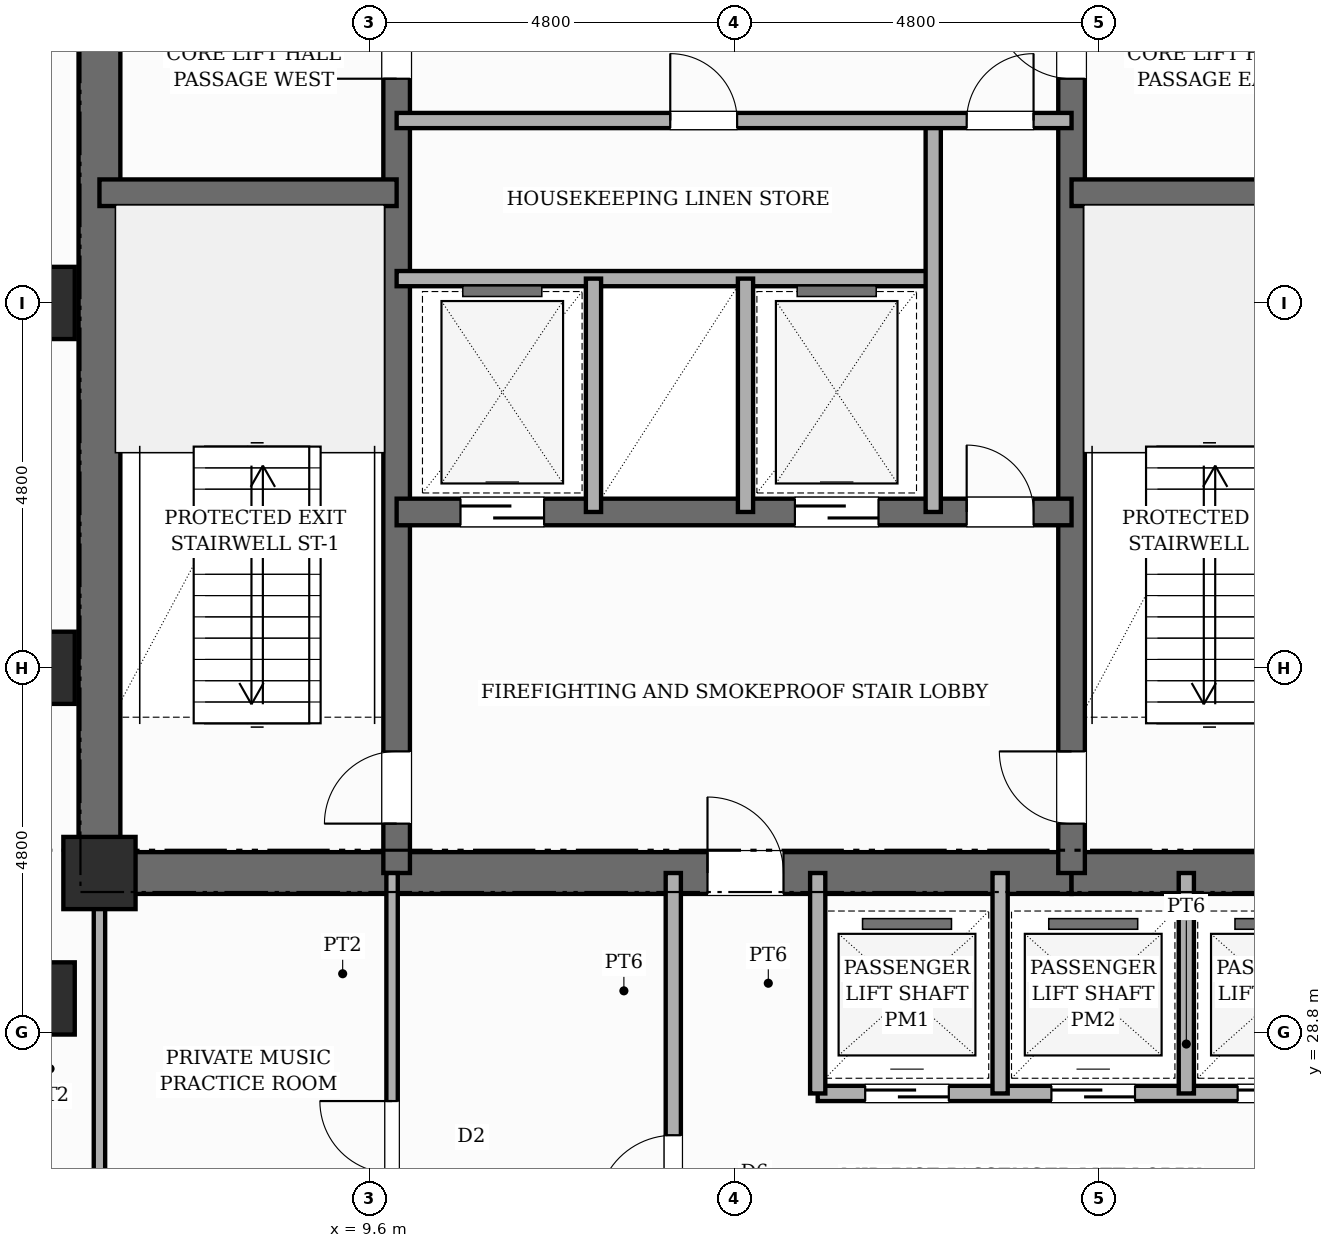
"""IFC4 building model, lengths in metres.
Left out: names, types, materials, properties, quantities, classifications, styles, units other than length and angle.
Written with IfcOpenShell. Run it as: python <this file> out.ifc"""

import sys

from ifc_helpers import new_model, si_unit, direction, frame, frame_2d, origin, origin_2d, place, context, subcontext, project, spatial, rectangle, extrude, element, fill, save


model = new_model("IFC4")
c1 = context("Model", 3, precision=1e-05, world=origin(), true_north=direction((0.0, 1.0)))
c2 = subcontext(c1, "Body", "Model", "MODEL_VIEW")
j1 = project(units=[si_unit("LENGTHUNIT", "METRE"), si_unit("PLANEANGLEUNIT", "RADIAN")], contexts=[c1])
p1 = place(None, origin())
s1 = spatial("IfcSite", under=j1, at=p1, CompositionType="ELEMENT")
p2 = place(p1, origin())
s2 = spatial("IfcBuilding", under=s1, at=p2, CompositionType="ELEMENT")
p3 = place(p2, frame((0.0, 0.0, 193.6)))
s3 = spatial("IfcBuildingStorey", under=s2, at=p3, CompositionType="ELEMENT", Elevation=193.6)
p4 = place(p3, frame((6.05, 30.625, 0.0), z_axis=(0.0, 0.0, 1.0), x_axis=(0.0, 1.0, 0.0)))
e1 = element("IfcWall", 1, at=p4, inside=s3, PredefinedType="SHEAR", context=c2, shape_type="SweptSolid", body=[
    extrude(rectangle(XDim=15.45, YDim=0.55, at=frame_2d((7.725, 0.0))), origin(), (0.0, 0.0, 1.0), 4.8),
])
p5 = place(p3, frame((6.05, 30.9, 0.0), z_axis=(0.0, 0.0, 1.0), x_axis=(1.0, 0.0, 0.0)))
e2 = element("IfcWall", 2, at=p5, inside=s3, PredefinedType="SHEAR", context=c2, shape_type="SweptSolid", body=[
    extrude(rectangle(XDim=3.91, YDim=0.55, at=frame_2d((1.955, 0.0))), origin(), (0.0, 0.0, 1.0), 4.8),
])
p6 = place(p3, frame((9.96, 30.9, 0.0), z_axis=(0.0, 0.0, 1.0), x_axis=(1.0, 0.0, 0.0)))
e3 = element("IfcWall", 3, at=p6, inside=s3, PredefinedType="SHEAR", context=c2, shape_type="SweptSolid", body=[
    extrude(rectangle(XDim=8.88, YDim=0.55, at=frame_2d((4.44, 0.0))), origin(), (0.0, 0.0, 1.0), 4.8),
])
p7 = place(p6, frame((4.09, 0.0, 0.0)))
e4 = element("IfcOpeningElement", 4, at=p7, cuts=e3, PredefinedType="OPENING", context=c2, shape_type="SweptSolid", body=[
    extrude(rectangle(XDim=1.0, YDim=2.15, at=frame_2d((0.5, 1.075))), frame((0.0, 0.285, 0.0), z_axis=(0.0, -1.0, 0.0), x_axis=(1.0, 0.0, 0.0)), (0.0, 0.0, 1.0), 0.57),
])
p8 = place(p3, frame((18.84, 30.9, 0.0), z_axis=(0.0, 0.0, 1.0), x_axis=(1.0, 0.0, 0.0)))
e5 = element("IfcWall", 5, at=p8, inside=s3, PredefinedType="SHEAR", context=c2, shape_type="SweptSolid", body=[
    extrude(rectangle(XDim=3.91, YDim=0.55, at=frame_2d((1.955, 0.0))), origin(), (0.0, 0.0, 1.0), 4.8),
])
p9 = place(p3, frame((9.96, 30.9, 0.0), z_axis=(0.0, 0.0, 1.0), x_axis=(0.0, 1.0, 0.0)))
e6 = element("IfcWall", 6, at=p9, inside=s3, PredefinedType="SHEAR", context=c2, shape_type="SweptSolid", body=[
    extrude(rectangle(XDim=14.9, YDim=0.35, at=frame_2d((7.45, 0.0))), origin(), (0.0, 0.0, 1.0), 4.8),
])
p10 = place(p9, frame((0.65, 0.0, 0.0)))
e7 = element("IfcOpeningElement", 7, at=p10, cuts=e6, PredefinedType="OPENING", context=c2, shape_type="SweptSolid", body=[
    extrude(rectangle(XDim=0.95, YDim=2.1, at=frame_2d((0.475, 1.05))), frame((0.0, 0.185, 0.0), z_axis=(0.0, -1.0, 0.0), x_axis=(1.0, 0.0, 0.0)), (0.0, 0.0, 1.0), 0.37),
])
p11 = place(p9, frame((10.45, 0.0, 0.0)))
e8 = element("IfcOpeningElement", 8, at=p11, cuts=e6, PredefinedType="OPENING", context=c2, shape_type="SweptSolid", body=[
    extrude(rectangle(XDim=1.0, YDim=2.15, at=frame_2d((0.5, 1.075))), frame((0.0, 0.185, 0.0), z_axis=(0.0, -1.0, 0.0), x_axis=(1.0, 0.0, 0.0)), (0.0, 0.0, 1.0), 0.37),
])
p12 = place(p3, frame((18.84, 30.9, 0.0), z_axis=(0.0, 0.0, 1.0), x_axis=(0.0, 1.0, 0.0)))
e9 = element("IfcWall", 9, at=p12, inside=s3, PredefinedType="SHEAR", context=c2, shape_type="SweptSolid", body=[
    extrude(rectangle(XDim=14.9, YDim=0.35, at=frame_2d((7.45, 0.0))), origin(), (0.0, 0.0, 1.0), 4.8),
])
p13 = place(p12, frame((0.65, 0.0, 0.0)))
e10 = element("IfcOpeningElement", 10, at=p13, cuts=e9, PredefinedType="OPENING", context=c2, shape_type="SweptSolid", body=[
    extrude(rectangle(XDim=0.95, YDim=2.1, at=frame_2d((0.475, 1.05))), frame((0.0, 0.185, 0.0), z_axis=(0.0, -1.0, 0.0), x_axis=(1.0, 0.0, 0.0)), (0.0, 0.0, 1.0), 0.37),
])
p14 = place(p12, frame((10.45, 0.0, 0.0)))
e11 = element("IfcOpeningElement", 11, at=p14, cuts=e9, PredefinedType="OPENING", context=c2, shape_type="SweptSolid", body=[
    extrude(rectangle(XDim=1.0, YDim=2.15, at=frame_2d((0.5, 1.075))), frame((0.0, 0.185, 0.0), z_axis=(0.0, -1.0, 0.0), x_axis=(1.0, 0.0, 0.0)), (0.0, 0.0, 1.0), 0.37),
])
for number, where, z_axis, x_axis in (
    (12, (6.05, 39.85, 0.0), (0.0, 0.0, 1.0), (1.0, 0.0, 0.0)),
    (13, (18.84, 39.85, 0.0), (0.0, 0.0, 1.0), (1.0, 0.0, 0.0)),
):
    element("IfcWall", number, at=place(p3, frame(where, z_axis=z_axis, x_axis=x_axis)), inside=s3, PredefinedType="SHEAR", context=c2, shape_type="SweptSolid", body=[
        extrude(rectangle(XDim=3.91, YDim=0.35, at=frame_2d((1.955, 0.0))), origin(), (0.0, 0.0, 1.0), 4.8),
    ])
p15 = place(p3, frame((9.96, 35.65, 0.0), z_axis=(0.0, 0.0, 1.0), x_axis=(1.0, 0.0, 0.0)))
e14 = element("IfcWall", 14, at=p15, inside=s3, PredefinedType="SHEAR", context=c2, shape_type="SweptSolid", body=[
    extrude(rectangle(XDim=8.88, YDim=0.35, at=frame_2d((4.44, 0.0))), origin(), (0.0, 0.0, 1.0), 4.8),
])
p16 = place(p15, frame((0.84, 0.0, 0.0)))
e15 = element("IfcOpeningElement", 15, at=p16, cuts=e14, PredefinedType="OPENING", context=c2, shape_type="SweptSolid", body=[
    extrude(rectangle(XDim=1.1, YDim=2.15, at=frame_2d((0.55, 1.075))), frame((0.0, 0.185, 0.0), z_axis=(0.0, -1.0, 0.0), x_axis=(1.0, 0.0, 0.0)), (0.0, 0.0, 1.0), 0.37),
])
p17 = place(p15, frame((5.24, 0.0, 0.0)))
e16 = element("IfcOpeningElement", 16, at=p17, cuts=e14, PredefinedType="OPENING", context=c2, shape_type="SweptSolid", body=[
    extrude(rectangle(XDim=1.1, YDim=2.15, at=frame_2d((0.55, 1.075))), frame((0.0, 0.185, 0.0), z_axis=(0.0, -1.0, 0.0), x_axis=(1.0, 0.0, 0.0)), (0.0, 0.0, 1.0), 0.37),
])
p18 = place(p15, frame((7.5, 0.0, 0.0)))
e17 = element("IfcOpeningElement", 17, at=p18, cuts=e14, PredefinedType="OPENING", context=c2, shape_type="SweptSolid", body=[
    extrude(rectangle(XDim=0.88, YDim=2.1, at=frame_2d((0.44, 1.05))), frame((0.0, 0.185, 0.0), z_axis=(0.0, -1.0, 0.0), x_axis=(1.0, 0.0, 0.0)), (0.0, 0.0, 1.0), 0.37),
])
for number, where, z_axis, x_axis in (
    (18, (5.25, 29.25, 0.0), (0.0, 0.0, 1.0), (1.0, 0.0, 0.0)),
    (19, (5.25, 33.6, 0.0), (0.0, 0.0, 1.0), (1.0, 0.0, 0.0)),
    (20, (5.25, 38.4, 0.0), (0.0, 0.0, 1.0), (1.0, 0.0, 0.0)),
    (21, (6.05, 30.9, 0.0), (0.0, 0.0, 1.0), (1.0, 0.0, 0.0)),
):
    element("IfcColumn", number, at=place(p3, frame(where, z_axis=z_axis, x_axis=x_axis)), inside=s3, PredefinedType="COLUMN", context=c2, shape_type="SweptSolid", body=[
        extrude(rectangle(XDim=0.95, YDim=0.95, at=origin_2d()), origin(), (0.0, 0.0, 1.0), 4.8),
    ])
p19 = place(p3, frame((9.96, 38.72, 0.0), z_axis=(0.0, 0.0, 1.0), x_axis=(1.0, 0.0, 0.0)))
e22 = element("IfcWall", 22, at=p19, inside=s3, PredefinedType="POLYGONAL", context=c2, shape_type="SweptSolid", body=[
    extrude(rectangle(XDim=7.06, YDim=0.2, at=frame_2d((3.53, 0.0))), origin(), (0.0, 0.0, 1.0), 4.5),
])
for number, where, z_axis, x_axis in (
    (23, (12.55, 35.65, 0.0), (0.0, 0.0, 1.0), (0.0, 1.0, 0.0)),
    (24, (14.55, 35.65, 0.0), (0.0, 0.0, 1.0), (0.0, 1.0, 0.0)),
):
    element("IfcWall", number, at=place(p3, frame(where, z_axis=z_axis, x_axis=x_axis)), inside=s3, PredefinedType="POLYGONAL", context=c2, shape_type="SweptSolid", body=[
        extrude(rectangle(XDim=3.07, YDim=0.2, at=frame_2d((1.535, 0.0))), origin(), (0.0, 0.0, 1.0), 4.5),
    ])
p20 = place(p3, frame((17.02, 35.65, 0.0), z_axis=(0.0, 0.0, 1.0), x_axis=(0.0, 1.0, 0.0)))
e25 = element("IfcWall", 25, at=p20, inside=s3, PredefinedType="POLYGONAL", context=c2, shape_type="SweptSolid", body=[
    extrude(rectangle(XDim=5.15, YDim=0.2, at=frame_2d((2.575, 0.0))), origin(), (0.0, 0.0, 1.0), 4.5),
])
p21 = place(p3, frame((9.96, 40.8, 0.0), z_axis=(0.0, 0.0, 1.0), x_axis=(1.0, 0.0, 0.0)))
e26 = element("IfcWall", 26, at=p21, inside=s3, PredefinedType="POLYGONAL", context=c2, shape_type="SweptSolid", body=[
    extrude(rectangle(XDim=8.88, YDim=0.2, at=frame_2d((4.44, 0.0))), origin(), (0.0, 0.0, 1.0), 4.5),
])
p22 = place(p21, frame((7.5, 0.0, 0.0)))
e27 = element("IfcOpeningElement", 27, at=p22, cuts=e26, PredefinedType="OPENING", context=c2, shape_type="SweptSolid", body=[
    extrude(rectangle(XDim=0.88, YDim=2.1, at=frame_2d((0.44, 1.05))), frame((0.0, 0.11, 0.0), z_axis=(0.0, -1.0, 0.0), x_axis=(1.0, 0.0, 0.0)), (0.0, 0.0, 1.0), 0.22),
])
p23 = place(p21, frame((3.6, 0.0, 0.0)))
e28 = element("IfcOpeningElement", 28, at=p23, cuts=e26, PredefinedType="OPENING", context=c2, shape_type="SweptSolid", body=[
    extrude(rectangle(XDim=0.88, YDim=2.1, at=frame_2d((0.44, 1.05))), frame((0.0, 0.11, 0.0), z_axis=(0.0, -1.0, 0.0), x_axis=(1.0, 0.0, 0.0)), (0.0, 0.0, 1.0), 0.22),
])
p24 = place(p3, frame((13.6, 25.75, 0.0), z_axis=(0.0, 0.0, 1.0), x_axis=(0.0, 1.0, 0.0)))
e29 = element("IfcWall", 29, at=p24, inside=s3, PredefinedType="POLYGONAL", context=c2, shape_type="SweptSolid", body=[
    extrude(rectangle(XDim=5.15, YDim=0.2, at=frame_2d((2.575, 0.0))), origin(), (0.0, 0.0, 1.0), 4.5),
])
p25 = place(p24, frame((0.7, 0.0, 0.0)))
e30 = element("IfcOpeningElement", 30, at=p25, cuts=e29, PredefinedType="OPENING", context=c2, shape_type="SweptSolid", body=[
    extrude(rectangle(XDim=1.0, YDim=2.15, at=frame_2d((0.5, 1.075))), frame((0.0, 0.11, 0.0), z_axis=(0.0, -1.0, 0.0), x_axis=(1.0, 0.0, 0.0)), (0.0, 0.0, 1.0), 0.22),
])
p26 = place(p3, frame((6.05, 25.75, 0.0), z_axis=(0.0, 0.0, 1.0), x_axis=(0.0, 1.0, 0.0)))
e31 = element("IfcWall", 31, at=p26, inside=s3, PredefinedType="PARTITIONING", context=c2, shape_type="SweptSolid", body=[
    extrude(rectangle(XDim=5.15, YDim=0.15, at=frame_2d((2.575, 0.0))), origin(), (0.0, 0.0, 1.0), 4.5),
])
p27 = place(p3, frame((9.9, 25.75, 0.0), z_axis=(0.0, 0.0, 1.0), x_axis=(0.0, 1.0, 0.0)))
e32 = element("IfcWall", 32, at=p27, inside=s3, PredefinedType="PARTITIONING", context=c2, shape_type="SweptSolid", body=[
    extrude(rectangle(XDim=5.15, YDim=0.15, at=frame_2d((2.575, 0.0))), origin(), (0.0, 0.0, 1.0), 4.5),
])
p28 = place(p27, frame((1.2, 0.0, 0.0)))
e33 = element("IfcOpeningElement", 33, at=p28, cuts=e32, PredefinedType="OPENING", context=c2, shape_type="SweptSolid", body=[
    extrude(rectangle(XDim=0.95, YDim=2.15, at=frame_2d((0.475, 1.075))), frame((0.0, 0.085, 0.0), z_axis=(0.0, -1.0, 0.0), x_axis=(1.0, 0.0, 0.0)), (0.0, 0.0, 1.0), 0.17),
])
p29 = place(p3, frame((15.5, 28.0, 0.0), z_axis=(0.0, 0.0, 1.0), x_axis=(1.0, 0.0, 0.0)))
e34 = element("IfcWall", 34, at=p29, inside=s3, PredefinedType="POLYGONAL", context=c2, shape_type="SweptSolid", body=[
    extrude(rectangle(XDim=7.25, YDim=0.2, at=frame_2d((3.625, 0.0))), origin(), (0.0, 0.0, 1.0), 4.5),
])
p30 = place(p29, frame((0.625, 0.0, 0.0)))
e35 = element("IfcOpeningElement", 35, at=p30, cuts=e34, PredefinedType="OPENING", context=c2, shape_type="SweptSolid", body=[
    extrude(rectangle(XDim=1.1, YDim=2.15, at=frame_2d((0.55, 1.075))), frame((0.0, 0.11, 0.0), z_axis=(0.0, -1.0, 0.0), x_axis=(1.0, 0.0, 0.0)), (0.0, 0.0, 1.0), 0.22),
])
p31 = place(p29, frame((3.075, 0.0, 0.0)))
e36 = element("IfcOpeningElement", 36, at=p31, cuts=e34, PredefinedType="OPENING", context=c2, shape_type="SweptSolid", body=[
    extrude(rectangle(XDim=1.1, YDim=2.15, at=frame_2d((0.55, 1.075))), frame((0.0, 0.11, 0.0), z_axis=(0.0, -1.0, 0.0), x_axis=(1.0, 0.0, 0.0)), (0.0, 0.0, 1.0), 0.22),
])
p32 = place(p29, frame((5.525, 0.0, 0.0)))
e37 = element("IfcOpeningElement", 37, at=p32, cuts=e34, PredefinedType="OPENING", context=c2, shape_type="SweptSolid", body=[
    extrude(rectangle(XDim=1.1, YDim=2.15, at=frame_2d((0.55, 1.075))), frame((0.0, 0.11, 0.0), z_axis=(0.0, -1.0, 0.0), x_axis=(1.0, 0.0, 0.0)), (0.0, 0.0, 1.0), 0.22),
])
for number, where, z_axis, x_axis in (
    (38, (15.5, 28.0, 0.0), (0.0, 0.0, 1.0), (0.0, 1.0, 0.0)),
    (39, (17.9, 28.0, 0.0), (0.0, 0.0, 1.0), (0.0, 1.0, 0.0)),
    (40, (20.35, 28.0, 0.0), (0.0, 0.0, 1.0), (0.0, 1.0, 0.0)),
):
    element("IfcWall", number, at=place(p3, frame(where, z_axis=z_axis, x_axis=x_axis)), inside=s3, PredefinedType="POLYGONAL", context=c2, shape_type="SweptSolid", body=[
        extrude(rectangle(XDim=2.9, YDim=0.2, at=frame_2d((1.45, 0.0))), origin(), (0.0, 0.0, 1.0), 4.5),
    ])
p33 = place(p10, origin())
e41 = element("IfcDoor", 41, at=p33, inside=s3, OperationType="SINGLE_SWING_LEFT", PredefinedType="DOOR", context=c2, shape_type="SweptSolid", body=[
    extrude(rectangle(XDim=0.95, YDim=2.1, at=frame_2d((0.475, 1.05))), frame((0.0, 0.025, 0.0), z_axis=(0.0, -1.0, 0.0), x_axis=(1.0, 0.0, 0.0)), (0.0, 0.0, 1.0), 0.05),
])
fill(e7, e41)
p34 = place(p13, origin())
e42 = element("IfcDoor", 42, at=p34, inside=s3, OperationType="SINGLE_SWING_RIGHT", PredefinedType="DOOR", context=c2, shape_type="SweptSolid", body=[
    extrude(rectangle(XDim=0.95, YDim=2.1, at=frame_2d((0.475, 1.05))), frame((0.0, 0.025, 0.0), z_axis=(0.0, -1.0, 0.0), x_axis=(1.0, 0.0, 0.0)), (0.0, 0.0, 1.0), 0.05),
])
fill(e10, e42)
p35 = place(p7, origin())
e43 = element("IfcDoor", 43, at=p35, inside=s3, OperationType="SINGLE_SWING_LEFT", PredefinedType="DOOR", context=c2, shape_type="SweptSolid", body=[
    extrude(rectangle(XDim=1.0, YDim=2.15, at=frame_2d((0.5, 1.075))), frame((0.0, 0.025, 0.0), z_axis=(0.0, -1.0, 0.0), x_axis=(1.0, 0.0, 0.0)), (0.0, 0.0, 1.0), 0.05),
])
fill(e4, e43)
p36 = place(p16, origin())
e44 = element("IfcDoor", 44, at=p36, inside=s3, OperationType="SLIDING_TO_LEFT", PredefinedType="DOOR", context=c2, shape_type="SweptSolid", body=[
    extrude(rectangle(XDim=1.1, YDim=2.15, at=frame_2d((0.55, 1.075))), frame((0.0, 0.025, 0.0), z_axis=(0.0, -1.0, 0.0), x_axis=(1.0, 0.0, 0.0)), (0.0, 0.0, 1.0), 0.05),
])
fill(e15, e44)
p37 = place(p17, origin())
e45 = element("IfcDoor", 45, at=p37, inside=s3, OperationType="SLIDING_TO_RIGHT", PredefinedType="DOOR", context=c2, shape_type="SweptSolid", body=[
    extrude(rectangle(XDim=1.1, YDim=2.15, at=frame_2d((0.55, 1.075))), frame((0.0, 0.025, 0.0), z_axis=(0.0, -1.0, 0.0), x_axis=(1.0, 0.0, 0.0)), (0.0, 0.0, 1.0), 0.05),
])
fill(e16, e45)
p38 = place(p18, origin())
e46 = element("IfcDoor", 46, at=p38, inside=s3, OperationType="SINGLE_SWING_LEFT", PredefinedType="DOOR", context=c2, shape_type="SweptSolid", body=[
    extrude(rectangle(XDim=0.88, YDim=2.1, at=frame_2d((0.44, 1.05))), frame((0.0, 0.025, 0.0), z_axis=(0.0, -1.0, 0.0), x_axis=(1.0, 0.0, 0.0)), (0.0, 0.0, 1.0), 0.05),
])
fill(e17, e46)
p39 = place(p22, origin())
e47 = element("IfcDoor", 47, at=p39, inside=s3, OperationType="SINGLE_SWING_RIGHT", PredefinedType="DOOR", context=c2, shape_type="SweptSolid", body=[
    extrude(rectangle(XDim=0.88, YDim=2.1, at=frame_2d((0.44, 1.05))), frame((0.0, 0.025, 0.0), z_axis=(0.0, -1.0, 0.0), x_axis=(1.0, 0.0, 0.0)), (0.0, 0.0, 1.0), 0.05),
])
fill(e27, e47)
p40 = place(p11, origin())
e48 = element("IfcDoor", 48, at=p40, inside=s3, OperationType="SINGLE_SWING_LEFT", PredefinedType="DOOR", context=c2, shape_type="SweptSolid", body=[
    extrude(rectangle(XDim=1.0, YDim=2.15, at=frame_2d((0.5, 1.075))), frame((0.0, 0.025, 0.0), z_axis=(0.0, -1.0, 0.0), x_axis=(1.0, 0.0, 0.0)), (0.0, 0.0, 1.0), 0.05),
])
fill(e8, e48)
p41 = place(p14, origin())
e49 = element("IfcDoor", 49, at=p41, inside=s3, OperationType="SINGLE_SWING_RIGHT", PredefinedType="DOOR", context=c2, shape_type="SweptSolid", body=[
    extrude(rectangle(XDim=1.0, YDim=2.15, at=frame_2d((0.5, 1.075))), frame((0.0, 0.025, 0.0), z_axis=(0.0, -1.0, 0.0), x_axis=(1.0, 0.0, 0.0)), (0.0, 0.0, 1.0), 0.05),
])
fill(e11, e49)
p42 = place(p23, origin())
e50 = element("IfcDoor", 50, at=p42, inside=s3, OperationType="SINGLE_SWING_LEFT", PredefinedType="DOOR", context=c2, shape_type="SweptSolid", body=[
    extrude(rectangle(XDim=0.88, YDim=2.1, at=frame_2d((0.44, 1.05))), frame((0.0, 0.025, 0.0), z_axis=(0.0, -1.0, 0.0), x_axis=(1.0, 0.0, 0.0)), (0.0, 0.0, 1.0), 0.05),
])
fill(e28, e50)
p43 = place(p25, origin())
e51 = element("IfcDoor", 51, at=p43, inside=s3, OperationType="SINGLE_SWING_LEFT", PredefinedType="DOOR", context=c2, shape_type="SweptSolid", body=[
    extrude(rectangle(XDim=1.0, YDim=2.15, at=frame_2d((0.5, 1.075))), frame((0.0, 0.025, 0.0), z_axis=(0.0, -1.0, 0.0), x_axis=(1.0, 0.0, 0.0)), (0.0, 0.0, 1.0), 0.05),
])
fill(e30, e51)
p44 = place(p28, origin())
e52 = element("IfcDoor", 52, at=p44, inside=s3, OperationType="SINGLE_SWING_RIGHT", PredefinedType="DOOR", context=c2, shape_type="SweptSolid", body=[
    extrude(rectangle(XDim=0.95, YDim=2.15, at=frame_2d((0.475, 1.075))), frame((0.0, 0.025, 0.0), z_axis=(0.0, -1.0, 0.0), x_axis=(1.0, 0.0, 0.0)), (0.0, 0.0, 1.0), 0.05),
])
fill(e33, e52)
p45 = place(p30, origin())
e53 = element("IfcDoor", 53, at=p45, inside=s3, OperationType="SLIDING_TO_LEFT", PredefinedType="DOOR", context=c2, shape_type="SweptSolid", body=[
    extrude(rectangle(XDim=1.1, YDim=2.15, at=frame_2d((0.55, 1.075))), frame((0.0, 0.025, 0.0), z_axis=(0.0, -1.0, 0.0), x_axis=(1.0, 0.0, 0.0)), (0.0, 0.0, 1.0), 0.05),
])
fill(e35, e53)
p46 = place(p31, origin())
e54 = element("IfcDoor", 54, at=p46, inside=s3, OperationType="SLIDING_TO_RIGHT", PredefinedType="DOOR", context=c2, shape_type="SweptSolid", body=[
    extrude(rectangle(XDim=1.1, YDim=2.15, at=frame_2d((0.55, 1.075))), frame((0.0, 0.025, 0.0), z_axis=(0.0, -1.0, 0.0), x_axis=(1.0, 0.0, 0.0)), (0.0, 0.0, 1.0), 0.05),
])
fill(e36, e54)
p47 = place(p32, origin())
e55 = element("IfcDoor", 55, at=p47, inside=s3, OperationType="SLIDING_TO_LEFT", PredefinedType="DOOR", context=c2, shape_type="SweptSolid", body=[
    extrude(rectangle(XDim=1.1, YDim=2.15, at=frame_2d((0.55, 1.075))), frame((0.0, 0.025, 0.0), z_axis=(0.0, -1.0, 0.0), x_axis=(1.0, 0.0, 0.0)), (0.0, 0.0, 1.0), 0.05),
])
fill(e37, e55)
save(model, sys.argv[1])
